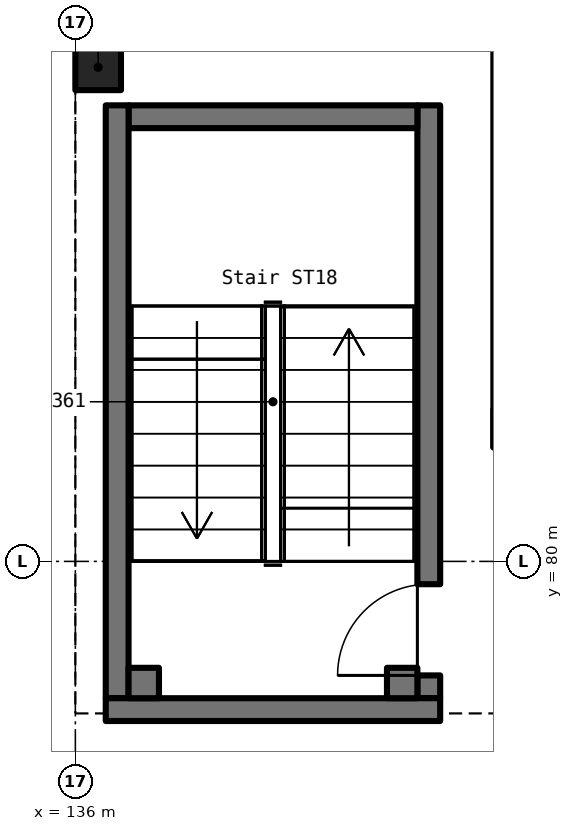
"""IFC4 building model, lengths in metres.
Left out: names, types, materials, properties, quantities, classifications, styles, units other than length and angle.
Written with IfcOpenShell. Run it as: python <this file> out.ifc"""

import sys

from ifc_helpers import new_model, si_unit, direction, frame, frame_2d, origin, origin_2d, place, context, subcontext, project, spatial, rectangle, extrude, element, fill, save


model = new_model("IFC4")
c1 = context("Model", 3, precision=1e-05, world=origin(), true_north=direction((0.0, 1.0)))
c2 = subcontext(c1, "Body", "Model", "MODEL_VIEW")
j1 = project(units=[si_unit("LENGTHUNIT", "METRE"), si_unit("PLANEANGLEUNIT", "RADIAN")], contexts=[c1])
p1 = place(None, origin())
s1 = spatial("IfcSite", under=j1, at=p1, CompositionType="ELEMENT")
p2 = place(p1, origin())
s2 = spatial("IfcBuilding", under=s1, at=p2, CompositionType="ELEMENT")
p3 = place(p2, frame((0.0, 0.0, -6.0)))
s3 = spatial("IfcBuildingStorey", under=s2, at=p3, CompositionType="ELEMENT", Elevation=-6.0)
p4 = place(p3, frame((136.3, 86.5, 0.0), z_axis=(0.0, 0.0, 1.0), x_axis=(1.0, 0.0, 0.0)))
e1 = element("IfcColumn", 1, at=p4, inside=s3, PredefinedType="COLUMN", context=c2, shape_type="SweptSolid", body=[
    extrude(rectangle(XDim=0.6, YDim=0.6, at=origin_2d()), origin(), (0.0, 0.0, 1.0), 6.0),
])
p5 = place(p3, frame((140.65, 78.2, 0.0), z_axis=(0.0, 0.0, 1.0), x_axis=(0.0, 1.0, 0.0)))
e2 = element("IfcWall", 2, at=p5, inside=s3, PredefinedType="SOLIDWALL", context=c2, shape_type="SweptSolid", body=[
    extrude(rectangle(XDim=7.8, YDim=0.3, at=frame_2d((3.9, 0.0))), origin(), (0.0, 0.0, 1.0), 6.0),
])
p6 = place(p5, frame((0.3, 0.0, 0.0)))
e3 = element("IfcOpeningElement", 3, at=p6, cuts=e2, PredefinedType="OPENING", context=c2, shape_type="SweptSolid", body=[
    extrude(rectangle(XDim=1.2, YDim=2.1, at=frame_2d((0.6, 1.05))), frame((0.0, 0.162, 0.0), z_axis=(0.0, -1.0, 0.0), x_axis=(1.0, 0.0, 0.0)), (0.0, 0.0, 1.0), 0.324),
])
p7 = place(p3, frame((140.5, 85.85, 0.0), z_axis=(0.0, 0.0, 1.0), x_axis=(-1.0, 0.0, 0.0)))
e4 = element("IfcWall", 4, at=p7, inside=s3, PredefinedType="SOLIDWALL", context=c2, shape_type="SweptSolid", body=[
    extrude(rectangle(XDim=3.8, YDim=0.3, at=frame_2d((1.9, 0.0))), origin(), (0.0, 0.0, 1.0), 6.0),
])
p8 = place(p3, frame((136.55, 86.0, 0.0), z_axis=(0.0, 0.0, 1.0), x_axis=(0.0, -1.0, 0.0)))
e5 = element("IfcWall", 5, at=p8, inside=s3, PredefinedType="SOLIDWALL", context=c2, shape_type="SweptSolid", body=[
    extrude(rectangle(XDim=7.8, YDim=0.3, at=frame_2d((3.9, 0.0))), origin(), (0.0, 0.0, 1.0), 6.0),
])
p9 = place(p3, frame((136.4, 78.05, 0.0), z_axis=(0.0, 0.0, 1.0), x_axis=(1.0, 0.0, 0.0)))
e6 = element("IfcWall", 6, at=p9, inside=s3, PredefinedType="SOLIDWALL", context=c2, shape_type="SweptSolid", body=[
    extrude(rectangle(XDim=4.4, YDim=0.3, at=frame_2d((2.2, 0.0))), origin(), (0.0, 0.0, 1.0), 6.0),
])
p10 = place(p3, frame((136.7, 78.4, 0.0), z_axis=(0.0, 0.0, 1.0), x_axis=(1.0, 0.0, 0.0)))
e7 = element("IfcWall", 7, at=p10, inside=s3, PredefinedType="SOLIDWALL", context=c2, shape_type="SweptSolid", body=[
    extrude(rectangle(XDim=0.4, YDim=0.4, at=frame_2d((0.2, 0.0))), origin(), (0.0, 0.0, 1.0), 6.0),
])
p11 = place(p3, frame((140.1, 78.4, 0.0), z_axis=(0.0, 0.0, 1.0), x_axis=(1.0, 0.0, 0.0)))
e8 = element("IfcWall", 8, at=p11, inside=s3, PredefinedType="SOLIDWALL", context=c2, shape_type="SweptSolid", body=[
    extrude(rectangle(XDim=0.4, YDim=0.4, at=frame_2d((0.2, 0.0))), origin(), (0.0, 0.0, 1.0), 6.0),
])
p12 = place(p6, origin())
e9 = element("IfcDoor", 9, at=p12, inside=s3, OperationType="SINGLE_SWING_LEFT", PredefinedType="DOOR", context=c2, shape_type="SweptSolid", body=[
    extrude(rectangle(XDim=1.2, YDim=2.1, at=frame_2d((0.6, 1.05))), frame((0.0, 0.025, 0.0), z_axis=(0.0, -1.0, 0.0), x_axis=(1.0, 0.0, 0.0)), (0.0, 0.0, 1.0), 0.05),
])
fill(e3, e9)
save(model, sys.argv[1])
